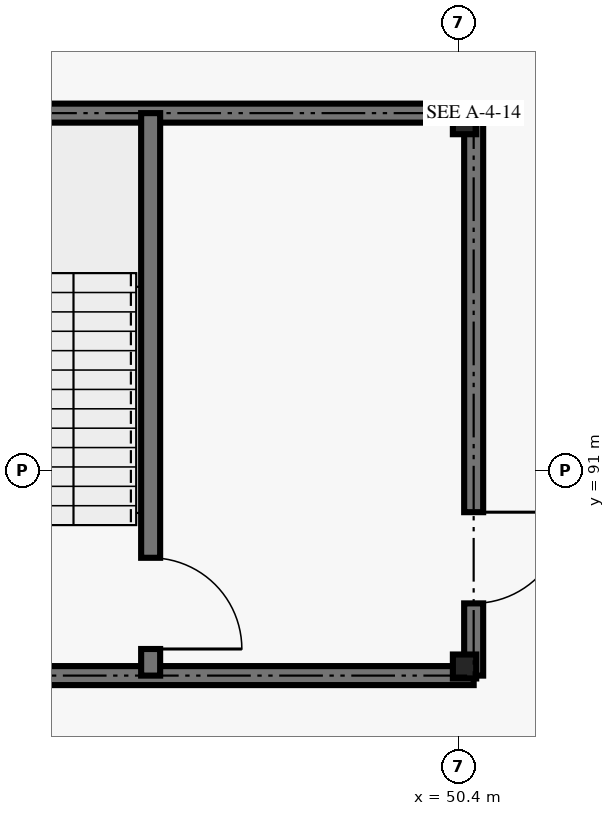
"""IFC4 building model, lengths in metres.
Left out: names, types, materials, properties, quantities, classifications, styles, units other than length and angle.
Written with IfcOpenShell. Run it as: python <this file> out.ifc"""

import sys

from ifc_helpers import new_model, si_unit, direction, frame, frame_2d, origin, origin_2d, place, context, subcontext, project, spatial, rectangle, i_section, extrude, element, fill, save


model = new_model("IFC4")
c1 = context("Model", 3, precision=1e-05, world=origin(), true_north=direction((0.0, 1.0)))
c2 = subcontext(c1, "Body", "Model", "MODEL_VIEW")
j1 = project(units=[si_unit("LENGTHUNIT", "METRE"), si_unit("PLANEANGLEUNIT", "RADIAN")], contexts=[c1])
p1 = place(None, origin())
s1 = spatial("IfcSite", under=j1, at=p1, CompositionType="ELEMENT")
p2 = place(p1, origin())
s2 = spatial("IfcBuilding", under=s1, at=p2, CompositionType="ELEMENT")
p3 = place(p2, frame((0.0, 0.0, 5.4)))
s3 = spatial("IfcBuildingStorey", under=s2, at=p3, CompositionType="ELEMENT", Elevation=5.4)
for number, where, z_axis, x_axis in (
    (1, (50.48, 88.42, 0.0), (0.0, 0.0, 1.0), (1.0, 0.0, 0.0)),
    (2, (50.48, 95.58, 0.0), (0.0, 0.0, 1.0), (1.0, 0.0, 0.0)),
):
    element("IfcColumn", number, at=place(p3, frame(where, z_axis=z_axis, x_axis=x_axis)), inside=s3, PredefinedType="COLUMN", context=c2, shape_type="SweptSolid", body=[
        extrude(i_section(OverallWidth=0.307, OverallDepth=0.315, WebThickness=0.012, FlangeThickness=0.019, FilletRadius=0.017, at=origin_2d()), origin(), (0.0, 0.0, 1.0), 4.8),
    ])
p4 = place(p3, frame((42.2, 110.2, 0.0), z_axis=(0.0, 0.0, 1.0), x_axis=(0.78200261515, -0.623275147827, 0.0)))
e3 = element("IfcWall", 3, at=p4, inside=s3, PredefinedType="SOLIDWALL", context=c2, shape_type="SweptSolid", body=[
    extrude(rectangle(XDim=25.831, YDim=0.4, at=frame_2d((12.916, 0.0))), origin(), (0.0, 0.0, 1.0), 3.62),
])
for number, where, z_axis, x_axis in (
    (4, (41.4, 95.7, 0.0), (0.0, 0.0, 1.0), (1.0, 0.0, 0.0)),
    (5, (50.6, 88.3, 0.0), (0.0, 0.0, 1.0), (-1.0, 0.0, 0.0)),
):
    element("IfcWall", number, at=place(p3, frame(where, z_axis=z_axis, x_axis=x_axis)), inside=s3, PredefinedType="SHEAR", context=c2, shape_type="SweptSolid", body=[
        extrude(rectangle(XDim=9.2, YDim=0.25, at=frame_2d((4.6, 0.0))), origin(), (0.0, 0.0, 1.0), 4.56),
    ])
p5 = place(p3, frame((50.6, 95.7, 0.0), z_axis=(0.0, 0.0, 1.0), x_axis=(0.0, -1.0, 0.0)))
e6 = element("IfcWall", 6, at=p5, inside=s3, PredefinedType="SHEAR", context=c2, shape_type="SweptSolid", body=[
    extrude(rectangle(XDim=7.4, YDim=0.25, at=frame_2d((3.7, 0.0))), origin(), (0.0, 0.0, 1.0), 4.56),
])
p6 = place(p5, frame((5.25, 0.0, 0.0)))
e7 = element("IfcOpeningElement", 7, at=p6, cuts=e6, PredefinedType="OPENING", context=c2, shape_type="SweptSolid", body=[
    extrude(rectangle(XDim=1.2, YDim=2.2, at=frame_2d((0.6, 1.1))), frame((0.0, 0.135, 0.0), z_axis=(0.0, -1.0, 0.0), x_axis=(1.0, 0.0, 0.0)), (0.0, 0.0, 1.0), 0.27),
])
p7 = place(p3, frame((46.35, 95.7, 0.0), z_axis=(0.0, 0.0, 1.0), x_axis=(0.0, -1.0, 0.0)))
e8 = element("IfcWall", 8, at=p7, inside=s3, PredefinedType="SHEAR", context=c2, shape_type="SweptSolid", body=[
    extrude(rectangle(XDim=7.4, YDim=0.25, at=frame_2d((3.7, 0.0))), origin(), (0.0, 0.0, 1.0), 4.56),
])
p8 = place(p7, frame((5.85, 0.0, 0.0)))
e9 = element("IfcOpeningElement", 9, at=p8, cuts=e8, PredefinedType="OPENING", context=c2, shape_type="SweptSolid", body=[
    extrude(rectangle(XDim=1.2, YDim=2.2, at=frame_2d((0.6, 1.1))), frame((0.0, 0.135, 0.0), z_axis=(0.0, -1.0, 0.0), x_axis=(1.0, 0.0, 0.0)), (0.0, 0.0, 1.0), 0.27),
])
p9 = place(p6, origin())
e10 = element("IfcDoor", 10, at=p9, inside=s3, OperationType="SINGLE_SWING_LEFT", PredefinedType="DOOR", context=c2, shape_type="SweptSolid", body=[
    extrude(rectangle(XDim=1.2, YDim=2.2, at=frame_2d((0.6, 1.1))), frame((0.0, 0.025, 0.0), z_axis=(0.0, -1.0, 0.0), x_axis=(1.0, 0.0, 0.0)), (0.0, 0.0, 1.0), 0.05),
])
fill(e7, e10)
p10 = place(p8, origin())
e11 = element("IfcDoor", 11, at=p10, inside=s3, OperationType="SINGLE_SWING_RIGHT", PredefinedType="DOOR", context=c2, shape_type="SweptSolid", body=[
    extrude(rectangle(XDim=1.2, YDim=2.2, at=frame_2d((0.6, 1.1))), frame((0.0, 0.025, 0.0), z_axis=(0.0, -1.0, 0.0), x_axis=(1.0, 0.0, 0.0)), (0.0, 0.0, 1.0), 0.05),
])
fill(e9, e11)
save(model, sys.argv[1])
